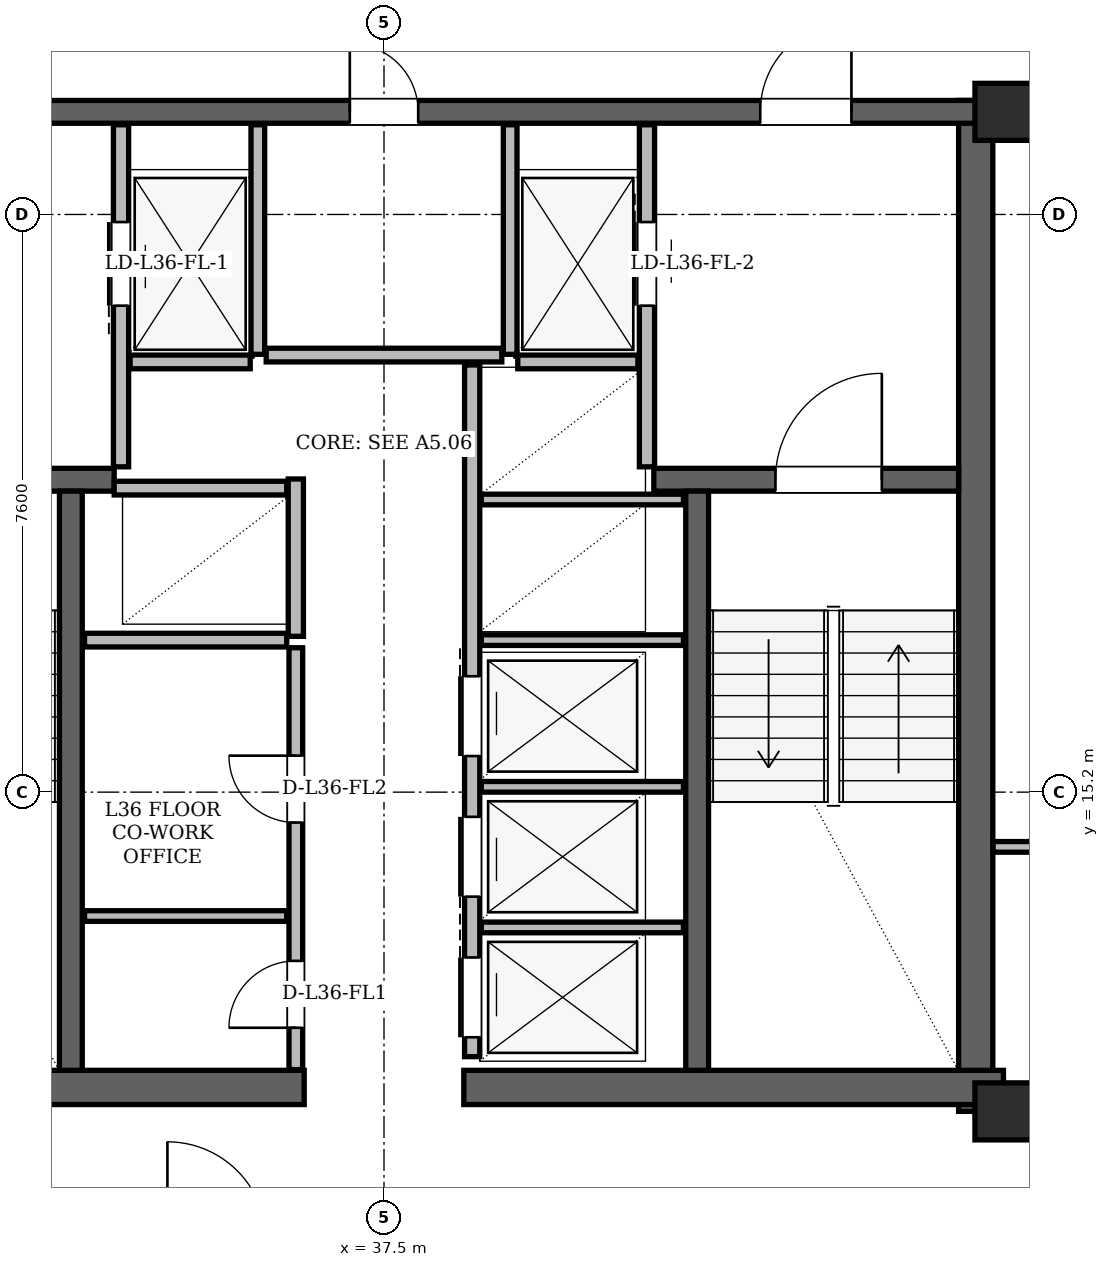
"""IFC4 building model, lengths in metres.
Left out: names, types, materials, properties, quantities, classifications, styles, units other than length and angle.
Written with IfcOpenShell. Run it as: python <this file> out.ifc"""

import sys

from ifc_helpers import new_model, si_unit, direction, frame, frame_2d, origin, origin_2d, place, context, subcontext, project, spatial, rectangle, hollow_rectangle, extrude, element, fill, save


model = new_model("IFC4")
c1 = context("Model", 3, precision=1e-05, world=origin(), true_north=direction((0.0, 1.0)))
c2 = subcontext(c1, "Body", "Model", "MODEL_VIEW")
j1 = project(units=[si_unit("LENGTHUNIT", "METRE"), si_unit("PLANEANGLEUNIT", "RADIAN")], contexts=[c1])
p1 = place(None, origin())
s1 = spatial("IfcSite", under=j1, at=p1, CompositionType="ELEMENT")
p2 = place(p1, origin())
s2 = spatial("IfcBuilding", under=s1, at=p2, CompositionType="ELEMENT")
p3 = place(p2, frame((0.0, 0.0, 138.6)))
s3 = spatial("IfcBuildingStorey", under=s2, at=p3, CompositionType="ELEMENT", Elevation=138.6)
for number, where, z_axis, x_axis in (
    (1, (45.65, 11.0, 0.0), (0.0, 0.0, 1.0), (1.0, 0.0, 0.0)),
    (2, (45.65, 24.15, 0.0), (0.0, 0.0, 1.0), (1.0, 0.0, 0.0)),
):
    element("IfcColumn", number, at=place(p3, frame(where, z_axis=z_axis, x_axis=x_axis)), inside=s3, PredefinedType="COLUMN", context=c2, shape_type="SweptSolid", body=[
        extrude(hollow_rectangle(XDim=0.75, YDim=0.75, WallThickness=0.06, at=origin_2d()), origin(), (0.0, 0.0, 1.0), 3.6),
    ])
p4 = place(p3, frame((45.285, 11.0, 0.0), z_axis=(0.0, 0.0, 1.0), x_axis=(0.0, 1.0, 0.0)))
e3 = element("IfcWall", 3, at=p4, inside=s3, PredefinedType="SHEAR", context=c2, shape_type="SweptSolid", body=[
    extrude(rectangle(XDim=13.3, YDim=0.45, at=frame_2d((6.65, 0.0))), origin(), (0.0, 0.0, 1.0), 3.36),
])
for number, where, z_axis, x_axis in (
    (4, (29.35, 11.315, 0.0), (0.0, 0.0, 1.0), (1.0, 0.0, 0.0)),
    (5, (38.55, 11.315, 0.0), (0.0, 0.0, 1.0), (1.0, 0.0, 0.0)),
):
    element("IfcWall", number, at=place(p3, frame(where, z_axis=z_axis, x_axis=x_axis)), inside=s3, PredefinedType="SHEAR", context=c2, shape_type="SweptSolid", body=[
        extrude(rectangle(XDim=7.1, YDim=0.45, at=frame_2d((3.55, 0.0))), origin(), (0.0, 0.0, 1.0), 3.36),
    ])
p5 = place(p3, frame((29.65, 24.15, 0.0), z_axis=(0.0, 0.0, 1.0), x_axis=(1.0, 0.0, 0.0)))
e6 = element("IfcWall", 6, at=p5, inside=s3, PredefinedType="SHEAR", context=c2, shape_type="SweptSolid", body=[
    extrude(rectangle(XDim=15.7, YDim=0.3, at=frame_2d((7.85, 0.0))), origin(), (0.0, 0.0, 1.0), 3.36),
])
p6 = place(p5, frame((1.7, 0.0, 0.0)))
e7 = element("IfcOpeningElement", 7, at=p6, cuts=e6, PredefinedType="OPENING", context=c2, shape_type="SweptSolid", body=[
    extrude(rectangle(XDim=1.2, YDim=2.2, at=frame_2d((0.6, 1.1))), frame((0.0, 0.15, 0.0), z_axis=(0.0, -1.0, 0.0), x_axis=(1.0, 0.0, 0.0)), (0.0, 0.0, 1.0), 0.3),
])
p7 = place(p5, frame((12.8, 0.0, 0.0)))
e8 = element("IfcOpeningElement", 8, at=p7, cuts=e6, PredefinedType="OPENING", context=c2, shape_type="SweptSolid", body=[
    extrude(rectangle(XDim=1.2, YDim=2.2, at=frame_2d((0.6, 1.1))), frame((0.0, 0.15, 0.0), z_axis=(0.0, -1.0, 0.0), x_axis=(1.0, 0.0, 0.0)), (0.0, 0.0, 1.0), 0.3),
])
p8 = place(p5, frame((7.4, 0.0, 0.0)))
e9 = element("IfcOpeningElement", 9, at=p8, cuts=e6, PredefinedType="OPENING", context=c2, shape_type="SweptSolid", body=[
    extrude(rectangle(XDim=0.9, YDim=2.05, at=frame_2d((0.45, 1.025))), frame((0.0, 0.15, 0.0), z_axis=(0.0, -1.0, 0.0), x_axis=(1.0, 0.0, 0.0)), (0.0, 0.0, 1.0), 0.3),
])
p9 = place(p3, frame((29.94, 19.31, 0.0), z_axis=(0.0, 0.0, 1.0), x_axis=(1.0, 0.0, 0.0)))
e10 = element("IfcWall", 10, at=p9, inside=s3, PredefinedType="SHEAR", context=c2, shape_type="SweptSolid", body=[
    extrude(rectangle(XDim=4.01, YDim=0.3, at=frame_2d((2.005, 0.0))), origin(), (0.0, 0.0, 1.0), 3.36),
])
p10 = place(p9, frame((1.01, 0.0, 0.0)))
e11 = element("IfcOpeningElement", 11, at=p10, cuts=e10, PredefinedType="OPENING", context=c2, shape_type="SweptSolid", body=[
    extrude(rectangle(XDim=1.4, YDim=2.2, at=frame_2d((0.7, 1.1))), frame((0.0, 0.15, 0.0), z_axis=(0.0, -1.0, 0.0), x_axis=(1.0, 0.0, 0.0)), (0.0, 0.0, 1.0), 0.3),
])
p11 = place(p3, frame((41.05, 19.31, 0.0), z_axis=(0.0, 0.0, 1.0), x_axis=(1.0, 0.0, 0.0)))
e12 = element("IfcWall", 12, at=p11, inside=s3, PredefinedType="SHEAR", context=c2, shape_type="SweptSolid", body=[
    extrude(rectangle(XDim=4.01, YDim=0.3, at=frame_2d((2.005, 0.0))), origin(), (0.0, 0.0, 1.0), 3.36),
])
p12 = place(p11, frame((1.6, 0.0, 0.0)))
e13 = element("IfcOpeningElement", 13, at=p12, cuts=e12, PredefinedType="OPENING", context=c2, shape_type="SweptSolid", body=[
    extrude(rectangle(XDim=1.4, YDim=2.2, at=frame_2d((0.7, 1.1))), frame((0.0, 0.15, 0.0), z_axis=(0.0, -1.0, 0.0), x_axis=(1.0, 0.0, 0.0)), (0.0, 0.0, 1.0), 0.3),
])
for number, where, z_axis, x_axis in (
    (14, (33.38, 11.54, 0.0), (0.0, 0.0, 1.0), (0.0, 1.0, 0.0)),
    (15, (41.62, 11.54, 0.0), (0.0, 0.0, 1.0), (0.0, 1.0, 0.0)),
):
    element("IfcWall", number, at=place(p3, frame(where, z_axis=z_axis, x_axis=x_axis)), inside=s3, PredefinedType="SHEAR", context=c2, shape_type="SweptSolid", body=[
        extrude(rectangle(XDim=7.62, YDim=0.3, at=frame_2d((3.81, 0.0))), origin(), (0.0, 0.0, 1.0), 3.36),
    ])
p13 = place(p3, frame((60.155, 12.82, 0.0), z_axis=(0.0, 0.0, 1.0), x_axis=(-0.499998325337, 0.86602637065, 0.0)))
e16 = element("IfcWall", 16, at=p13, inside=s3, PredefinedType="SOLIDWALL", context=c2, shape_type="SweptSolid", body=[
    extrude(rectangle(XDim=35.264, YDim=0.34, at=frame_2d((17.632, 0.0))), origin(), (0.0, 0.0, 1.0), 2.58),
])
p14 = place(p13, frame((6.579, 0.0, 0.0)))
e17 = element("IfcOpeningElement", 17, at=p14, cuts=e16, PredefinedType="OPENING", context=c2, shape_type="SweptSolid", body=[
    extrude(rectangle(XDim=1.5, YDim=2.2, at=frame_2d((0.75, 1.1))), frame((0.0, 0.17, 0.0), z_axis=(0.0, -1.0, 0.0), x_axis=(1.0, 0.0, 0.0)), (0.0, 0.0, 1.0), 0.34),
])
p15 = place(p13, frame((25.73, 0.0, 0.0)))
e18 = element("IfcOpeningElement", 18, at=p15, cuts=e16, PredefinedType="OPENING", context=c2, shape_type="SweptSolid", body=[
    extrude(rectangle(XDim=1.5, YDim=2.2, at=frame_2d((0.75, 1.1))), frame((0.0, 0.17, 0.0), z_axis=(0.0, -1.0, 0.0), x_axis=(1.0, 0.0, 0.0)), (0.0, 0.0, 1.0), 0.34),
])
p16 = place(p13, frame((3.541, 0.0, 0.85)))
e19 = element("IfcOpeningElement", 19, at=p16, cuts=e16, PredefinedType="OPENING", context=c2, shape_type="SweptSolid", body=[
    extrude(rectangle(XDim=1.2, YDim=1.48, at=frame_2d((0.6, 0.74))), frame((0.0, 0.17, 0.0), z_axis=(0.0, -1.0, 0.0), x_axis=(1.0, 0.0, 0.0)), (0.0, 0.0, 1.0), 0.34),
])
p17 = place(p13, frame((11.719, 0.0, 0.85)))
e20 = element("IfcOpeningElement", 20, at=p17, cuts=e16, PredefinedType="OPENING", context=c2, shape_type="SweptSolid", body=[
    extrude(rectangle(XDim=1.2, YDim=1.48, at=frame_2d((0.6, 0.74))), frame((0.0, 0.17, 0.0), z_axis=(0.0, -1.0, 0.0), x_axis=(1.0, 0.0, 0.0)), (0.0, 0.0, 1.0), 0.34),
])
p18 = place(p13, frame((15.189, 0.0, 0.85)))
e21 = element("IfcOpeningElement", 21, at=p18, cuts=e16, PredefinedType="OPENING", context=c2, shape_type="SweptSolid", body=[
    extrude(rectangle(XDim=2.8, YDim=1.62, at=frame_2d((1.4, 0.81))), frame((0.0, 0.17, 0.0), z_axis=(0.0, -1.0, 0.0), x_axis=(1.0, 0.0, 0.0)), (0.0, 0.0, 1.0), 0.34),
])
p19 = place(p13, frame((32.147, 0.0, 0.85)))
e22 = element("IfcOpeningElement", 22, at=p19, cuts=e16, PredefinedType="OPENING", context=c2, shape_type="SweptSolid", body=[
    extrude(rectangle(XDim=2.0, YDim=1.62, at=frame_2d((1.0, 0.81))), frame((0.0, 0.17, 0.0), z_axis=(0.0, -1.0, 0.0), x_axis=(1.0, 0.0, 0.0)), (0.0, 0.0, 1.0), 0.34),
])
p20 = place(p3, frame((34.04, 19.48, 0.0), z_axis=(0.0, 0.0, 1.0), x_axis=(0.0, 1.0, 0.0)))
e23 = element("IfcWall", 23, at=p20, inside=s3, PredefinedType="PARTITIONING", context=c2, shape_type="SweptSolid", body=[
    extrude(rectangle(XDim=4.5, YDim=0.2, at=frame_2d((2.25, 0.0))), origin(), (0.0, 0.0, 1.0), 2.4),
])
p21 = place(p20, frame((2.12, 0.0, 0.0)))
e24 = element("IfcOpeningElement", 24, at=p21, cuts=e23, PredefinedType="OPENING", context=c2, shape_type="SweptSolid", body=[
    extrude(rectangle(XDim=1.1, YDim=2.2, at=frame_2d((0.55, 1.1))), frame((0.0, 0.1, 0.0), z_axis=(0.0, -1.0, 0.0), x_axis=(1.0, 0.0, 0.0)), (0.0, 0.0, 1.0), 0.2),
])
p22 = place(p3, frame((35.84, 20.96, 0.0), z_axis=(0.0, 0.0, 1.0), x_axis=(0.0, 1.0, 0.0)))
e25 = element("IfcWall", 25, at=p22, inside=s3, PredefinedType="PARTITIONING", context=c2, shape_type="SweptSolid", body=[
    extrude(rectangle(XDim=3.02, YDim=0.18, at=frame_2d((1.51, 0.0))), origin(), (0.0, 0.0, 1.0), 2.4),
])
p23 = place(p3, frame((34.16, 20.86, 0.0), z_axis=(0.0, 0.0, 1.0), x_axis=(1.0, 0.0, 0.0)))
e26 = element("IfcWall", 26, at=p23, inside=s3, PredefinedType="PARTITIONING", context=c2, shape_type="SweptSolid", body=[
    extrude(rectangle(XDim=1.58, YDim=0.18, at=frame_2d((0.79, 0.0))), origin(), (0.0, 0.0, 1.0), 3.36),
])
p24 = place(p3, frame((40.96, 19.48, 0.0), z_axis=(0.0, 0.0, 1.0), x_axis=(0.0, 1.0, 0.0)))
e27 = element("IfcWall", 27, at=p24, inside=s3, PredefinedType="PARTITIONING", context=c2, shape_type="SweptSolid", body=[
    extrude(rectangle(XDim=4.5, YDim=0.2, at=frame_2d((2.25, 0.0))), origin(), (0.0, 0.0, 1.0), 2.4),
])
p25 = place(p24, frame((2.12, 0.0, 0.0)))
e28 = element("IfcOpeningElement", 28, at=p25, cuts=e27, PredefinedType="OPENING", context=c2, shape_type="SweptSolid", body=[
    extrude(rectangle(XDim=1.1, YDim=2.2, at=frame_2d((0.55, 1.1))), frame((0.0, 0.1, 0.0), z_axis=(0.0, -1.0, 0.0), x_axis=(1.0, 0.0, 0.0)), (0.0, 0.0, 1.0), 0.2),
])
p26 = place(p3, frame((39.16, 20.96, 0.0), z_axis=(0.0, 0.0, 1.0), x_axis=(0.0, 1.0, 0.0)))
e29 = element("IfcWall", 29, at=p26, inside=s3, PredefinedType="PARTITIONING", context=c2, shape_type="SweptSolid", body=[
    extrude(rectangle(XDim=3.02, YDim=0.18, at=frame_2d((1.51, 0.0))), origin(), (0.0, 0.0, 1.0), 2.4),
])
p27 = place(p3, frame((39.26, 20.86, 0.0), z_axis=(0.0, 0.0, 1.0), x_axis=(1.0, 0.0, 0.0)))
e30 = element("IfcWall", 30, at=p27, inside=s3, PredefinedType="PARTITIONING", context=c2, shape_type="SweptSolid", body=[
    extrude(rectangle(XDim=1.58, YDim=0.18, at=frame_2d((0.79, 0.0))), origin(), (0.0, 0.0, 1.0), 3.36),
])
p28 = place(p3, frame((36.34, 17.25, 0.0), z_axis=(0.0, 0.0, 1.0), x_axis=(0.0, 1.0, 0.0)))
e31 = element("IfcWall", 31, at=p28, inside=s3, PredefinedType="PARTITIONING", context=c2, shape_type="SweptSolid", body=[
    extrude(rectangle(XDim=2.07, YDim=0.2, at=frame_2d((1.035, 0.0))), origin(), (0.0, 0.0, 1.0), 3.36),
])
p29 = place(p3, frame((33.95, 19.2, 0.0), z_axis=(0.0, 0.0, 1.0), x_axis=(1.0, 0.0, 0.0)))
e32 = element("IfcWall", 32, at=p29, inside=s3, PredefinedType="PARTITIONING", context=c2, shape_type="SweptSolid", body=[
    extrude(rectangle(XDim=2.27, YDim=0.18, at=frame_2d((1.135, 0.0))), origin(), (0.0, 0.0, 1.0), 3.36),
])
p30 = place(p3, frame((33.56, 17.2, 0.0), z_axis=(0.0, 0.0, 1.0), x_axis=(1.0, 0.0, 0.0)))
e33 = element("IfcWall", 33, at=p30, inside=s3, PredefinedType="PARTITIONING", context=c2, shape_type="SweptSolid", body=[
    extrude(rectangle(XDim=2.66, YDim=0.18, at=frame_2d((1.33, 0.0))), origin(), (0.0, 0.0, 1.0), 3.36),
])
p31 = place(p3, frame((36.34, 11.55, 0.0), z_axis=(0.0, 0.0, 1.0), x_axis=(0.0, 1.0, 0.0)))
e34 = element("IfcWall", 34, at=p31, inside=s3, PredefinedType="PARTITIONING", context=c2, shape_type="SweptSolid", body=[
    extrude(rectangle(XDim=5.55, YDim=0.18, at=frame_2d((2.775, 0.0))), origin(), (0.0, 0.0, 1.0), 3.36),
])
p32 = place(p31, frame((0.55, 0.0, 0.0)))
e35 = element("IfcOpeningElement", 35, at=p32, cuts=e34, PredefinedType="OPENING", context=c2, shape_type="SweptSolid", body=[
    extrude(rectangle(XDim=0.88, YDim=2.08, at=frame_2d((0.44, 1.04))), frame((0.0, 0.09, 0.0), z_axis=(0.0, -1.0, 0.0), x_axis=(1.0, 0.0, 0.0)), (0.0, 0.0, 1.0), 0.18),
])
p33 = place(p31, frame((3.25, 0.0, 0.0)))
e36 = element("IfcOpeningElement", 36, at=p33, cuts=e34, PredefinedType="OPENING", context=c2, shape_type="SweptSolid", body=[
    extrude(rectangle(XDim=0.88, YDim=2.08, at=frame_2d((0.44, 1.04))), frame((0.0, 0.09, 0.0), z_axis=(0.0, -1.0, 0.0), x_axis=(1.0, 0.0, 0.0)), (0.0, 0.0, 1.0), 0.18),
])
p34 = place(p3, frame((33.56, 13.57, 0.0), z_axis=(0.0, 0.0, 1.0), x_axis=(1.0, 0.0, 0.0)))
e37 = element("IfcWall", 37, at=p34, inside=s3, PredefinedType="PARTITIONING", context=c2, shape_type="SweptSolid", body=[
    extrude(rectangle(XDim=2.66, YDim=0.14, at=frame_2d((1.33, 0.0))), origin(), (0.0, 0.0, 1.0), 3.36),
])
p35 = place(p3, frame((38.66, 11.72, 0.0), z_axis=(0.0, 0.0, 1.0), x_axis=(0.0, 1.0, 0.0)))
e38 = element("IfcWall", 38, at=p35, inside=s3, PredefinedType="PARTITIONING", context=c2, shape_type="SweptSolid", body=[
    extrude(rectangle(XDim=9.1, YDim=0.2, at=frame_2d((4.55, 0.0))), origin(), (0.0, 0.0, 1.0), 3.36),
])
p36 = place(p35, frame((0.255, 0.0, 0.0)))
e39 = element("IfcOpeningElement", 39, at=p36, cuts=e38, PredefinedType="OPENING", context=c2, shape_type="SweptSolid", body=[
    extrude(rectangle(XDim=1.05, YDim=2.15, at=frame_2d((0.525, 1.075))), frame((0.0, 0.1, 0.0), z_axis=(0.0, -1.0, 0.0), x_axis=(1.0, 0.0, 0.0)), (0.0, 0.0, 1.0), 0.2),
])
p37 = place(p35, frame((2.105, 0.0, 0.0)))
e40 = element("IfcOpeningElement", 40, at=p37, cuts=e38, PredefinedType="OPENING", context=c2, shape_type="SweptSolid", body=[
    extrude(rectangle(XDim=1.05, YDim=2.15, at=frame_2d((0.525, 1.075))), frame((0.0, 0.1, 0.0), z_axis=(0.0, -1.0, 0.0), x_axis=(1.0, 0.0, 0.0)), (0.0, 0.0, 1.0), 0.2),
])
p38 = place(p35, frame((3.955, 0.0, 0.0)))
e41 = element("IfcOpeningElement", 41, at=p38, cuts=e38, PredefinedType="OPENING", context=c2, shape_type="SweptSolid", body=[
    extrude(rectangle(XDim=1.05, YDim=2.15, at=frame_2d((0.525, 1.075))), frame((0.0, 0.1, 0.0), z_axis=(0.0, -1.0, 0.0), x_axis=(1.0, 0.0, 0.0)), (0.0, 0.0, 1.0), 0.2),
])
for number, where, z_axis, x_axis in (
    (42, (38.78, 13.42, 0.0), (0.0, 0.0, 1.0), (1.0, 0.0, 0.0)),
    (43, (38.78, 15.27, 0.0), (0.0, 0.0, 1.0), (1.0, 0.0, 0.0)),
    (44, (38.78, 17.2, 0.0), (0.0, 0.0, 1.0), (1.0, 0.0, 0.0)),
    (45, (38.78, 19.05, 0.0), (0.0, 0.0, 1.0), (1.0, 0.0, 0.0)),
):
    element("IfcWall", number, at=place(p3, frame(where, z_axis=z_axis, x_axis=x_axis)), inside=s3, PredefinedType="PARTITIONING", context=c2, shape_type="SweptSolid", body=[
        extrude(rectangle(XDim=2.66, YDim=0.14, at=frame_2d((1.33, 0.0))), origin(), (0.0, 0.0, 1.0), 3.36),
    ])
p39 = place(p3, frame((35.95, 20.95, 0.0), z_axis=(0.0, 0.0, 1.0), x_axis=(1.0, 0.0, 0.0)))
e46 = element("IfcWall", 46, at=p39, inside=s3, PredefinedType="PARTITIONING", context=c2, shape_type="SweptSolid", body=[
    extrude(rectangle(XDim=3.1, YDim=0.18, at=frame_2d((1.55, 0.0))), origin(), (0.0, 0.0, 1.0), 3.36),
])
p40 = place(p3, frame((45.514, 14.48, 0.0), z_axis=(0.0, 0.0, 1.0), x_axis=(1.0, 0.0, 0.0)))
e47 = element("IfcWall", 47, at=p40, inside=s3, PredefinedType="PARTITIONING", context=c2, shape_type="SweptSolid", body=[
    extrude(rectangle(XDim=13.481, YDim=0.14, at=frame_2d((6.741, 0.0))), origin(), (0.0, 0.0, 1.0), 2.4),
])
p41 = place(p40, frame((1.324, 0.0, 0.0)))
e48 = element("IfcOpeningElement", 48, at=p41, cuts=e47, PredefinedType="OPENING", context=c2, shape_type="SweptSolid", body=[
    extrude(rectangle(XDim=0.92, YDim=2.12, at=frame_2d((0.46, 1.06))), frame((0.0, 0.07, 0.0), z_axis=(0.0, -1.0, 0.0), x_axis=(1.0, 0.0, 0.0)), (0.0, 0.0, 1.0), 0.14),
])
p42 = place(p40, frame((4.721, 0.0, 0.0)))
e49 = element("IfcOpeningElement", 49, at=p42, cuts=e47, PredefinedType="OPENING", context=c2, shape_type="SweptSolid", body=[
    extrude(rectangle(XDim=0.92, YDim=2.12, at=frame_2d((0.46, 1.06))), frame((0.0, 0.07, 0.0), z_axis=(0.0, -1.0, 0.0), x_axis=(1.0, 0.0, 0.0)), (0.0, 0.0, 1.0), 0.14),
])
p43 = place(p40, frame((7.591, 0.0, 0.0)))
e50 = element("IfcOpeningElement", 50, at=p43, cuts=e47, PredefinedType="OPENING", context=c2, shape_type="SweptSolid", body=[
    extrude(rectangle(XDim=0.95, YDim=2.1, at=frame_2d((0.475, 1.05))), frame((0.0, 0.07, 0.0), z_axis=(0.0, -1.0, 0.0), x_axis=(1.0, 0.0, 0.0)), (0.0, 0.0, 1.0), 0.14),
])
p44 = place(p40, frame((9.995, 0.0, 0.0)))
e51 = element("IfcOpeningElement", 51, at=p44, cuts=e47, PredefinedType="OPENING", context=c2, shape_type="SweptSolid", body=[
    extrude(rectangle(XDim=0.95, YDim=2.1, at=frame_2d((0.475, 1.05))), frame((0.0, 0.07, 0.0), z_axis=(0.0, -1.0, 0.0), x_axis=(1.0, 0.0, 0.0)), (0.0, 0.0, 1.0), 0.14),
])
p45 = place(p40, frame((12.139, 0.0, 0.0)))
e52 = element("IfcOpeningElement", 52, at=p45, cuts=e47, PredefinedType="OPENING", context=c2, shape_type="SweptSolid", body=[
    extrude(rectangle(XDim=0.88, YDim=2.08, at=frame_2d((0.44, 1.04))), frame((0.0, 0.07, 0.0), z_axis=(0.0, -1.0, 0.0), x_axis=(1.0, 0.0, 0.0)), (0.0, 0.0, 1.0), 0.14),
])
p46 = place(p32, origin())
e53 = element("IfcDoor", 53, at=p46, inside=s3, OperationType="SINGLE_SWING_LEFT", PredefinedType="DOOR", context=c2, shape_type="SweptSolid", body=[
    extrude(rectangle(XDim=0.88, YDim=2.08, at=frame_2d((0.44, 1.04))), frame((0.0, 0.025, 0.0), z_axis=(0.0, -1.0, 0.0), x_axis=(1.0, 0.0, 0.0)), (0.0, 0.0, 1.0), 0.05),
])
fill(e35, e53)
p47 = place(p33, origin())
e54 = element("IfcDoor", 54, at=p47, inside=s3, OperationType="SINGLE_SWING_RIGHT", PredefinedType="DOOR", context=c2, shape_type="SweptSolid", body=[
    extrude(rectangle(XDim=0.88, YDim=2.08, at=frame_2d((0.44, 1.04))), frame((0.0, 0.025, 0.0), z_axis=(0.0, -1.0, 0.0), x_axis=(1.0, 0.0, 0.0)), (0.0, 0.0, 1.0), 0.05),
])
fill(e36, e54)
p48 = place(p21, origin())
e55 = element("IfcDoor", 55, at=p48, inside=s3, OperationType="SLIDING_TO_LEFT", PredefinedType="DOOR", context=c2, shape_type="SweptSolid", body=[
    extrude(rectangle(XDim=1.1, YDim=2.2, at=frame_2d((0.55, 1.1))), frame((0.0, 0.025, 0.0), z_axis=(0.0, -1.0, 0.0), x_axis=(1.0, 0.0, 0.0)), (0.0, 0.0, 1.0), 0.05),
])
fill(e24, e55)
p49 = place(p25, origin())
e56 = element("IfcDoor", 56, at=p49, inside=s3, OperationType="SLIDING_TO_RIGHT", PredefinedType="DOOR", context=c2, shape_type="SweptSolid", body=[
    extrude(rectangle(XDim=1.1, YDim=2.2, at=frame_2d((0.55, 1.1))), frame((0.0, 0.025, 0.0), z_axis=(0.0, -1.0, 0.0), x_axis=(1.0, 0.0, 0.0)), (0.0, 0.0, 1.0), 0.05),
])
fill(e28, e56)
p50 = place(p36, origin())
e57 = element("IfcDoor", 57, at=p50, inside=s3, OperationType="SLIDING_TO_RIGHT", PredefinedType="DOOR", context=c2, shape_type="SweptSolid", body=[
    extrude(rectangle(XDim=1.05, YDim=2.15, at=frame_2d((0.525, 1.075))), frame((0.0, 0.025, 0.0), z_axis=(0.0, -1.0, 0.0), x_axis=(1.0, 0.0, 0.0)), (0.0, 0.0, 1.0), 0.05),
])
fill(e39, e57)
p51 = place(p37, origin())
e58 = element("IfcDoor", 58, at=p51, inside=s3, OperationType="SLIDING_TO_LEFT", PredefinedType="DOOR", context=c2, shape_type="SweptSolid", body=[
    extrude(rectangle(XDim=1.05, YDim=2.15, at=frame_2d((0.525, 1.075))), frame((0.0, 0.025, 0.0), z_axis=(0.0, -1.0, 0.0), x_axis=(1.0, 0.0, 0.0)), (0.0, 0.0, 1.0), 0.05),
])
fill(e40, e58)
p52 = place(p38, origin())
e59 = element("IfcDoor", 59, at=p52, inside=s3, OperationType="SLIDING_TO_RIGHT", PredefinedType="DOOR", context=c2, shape_type="SweptSolid", body=[
    extrude(rectangle(XDim=1.05, YDim=2.15, at=frame_2d((0.525, 1.075))), frame((0.0, 0.025, 0.0), z_axis=(0.0, -1.0, 0.0), x_axis=(1.0, 0.0, 0.0)), (0.0, 0.0, 1.0), 0.05),
])
fill(e41, e59)
p53 = place(p12, origin())
e60 = element("IfcDoor", 60, at=p53, inside=s3, OperationType="SINGLE_SWING_RIGHT", PredefinedType="DOOR", context=c2, shape_type="SweptSolid", body=[
    extrude(rectangle(XDim=1.4, YDim=2.2, at=frame_2d((0.7, 1.1))), frame((0.0, 0.025, 0.0), z_axis=(0.0, -1.0, 0.0), x_axis=(1.0, 0.0, 0.0)), (0.0, 0.0, 1.0), 0.05),
])
fill(e13, e60)
p54 = place(p7, origin())
e61 = element("IfcDoor", 61, at=p54, inside=s3, OperationType="SINGLE_SWING_RIGHT", PredefinedType="DOOR", context=c2, shape_type="SweptSolid", body=[
    extrude(rectangle(XDim=1.2, YDim=2.2, at=frame_2d((0.6, 1.1))), frame((0.0, 0.025, 0.0), z_axis=(0.0, -1.0, 0.0), x_axis=(1.0, 0.0, 0.0)), (0.0, 0.0, 1.0), 0.05),
])
fill(e8, e61)
p55 = place(p8, origin())
e62 = element("IfcDoor", 62, at=p55, inside=s3, OperationType="SINGLE_SWING_LEFT", PredefinedType="DOOR", context=c2, shape_type="SweptSolid", body=[
    extrude(rectangle(XDim=0.9, YDim=2.05, at=frame_2d((0.45, 1.025))), frame((0.0, 0.025, 0.0), z_axis=(0.0, -1.0, 0.0), x_axis=(1.0, 0.0, 0.0)), (0.0, 0.0, 1.0), 0.05),
])
fill(e9, e62)
save(model, sys.argv[1])
